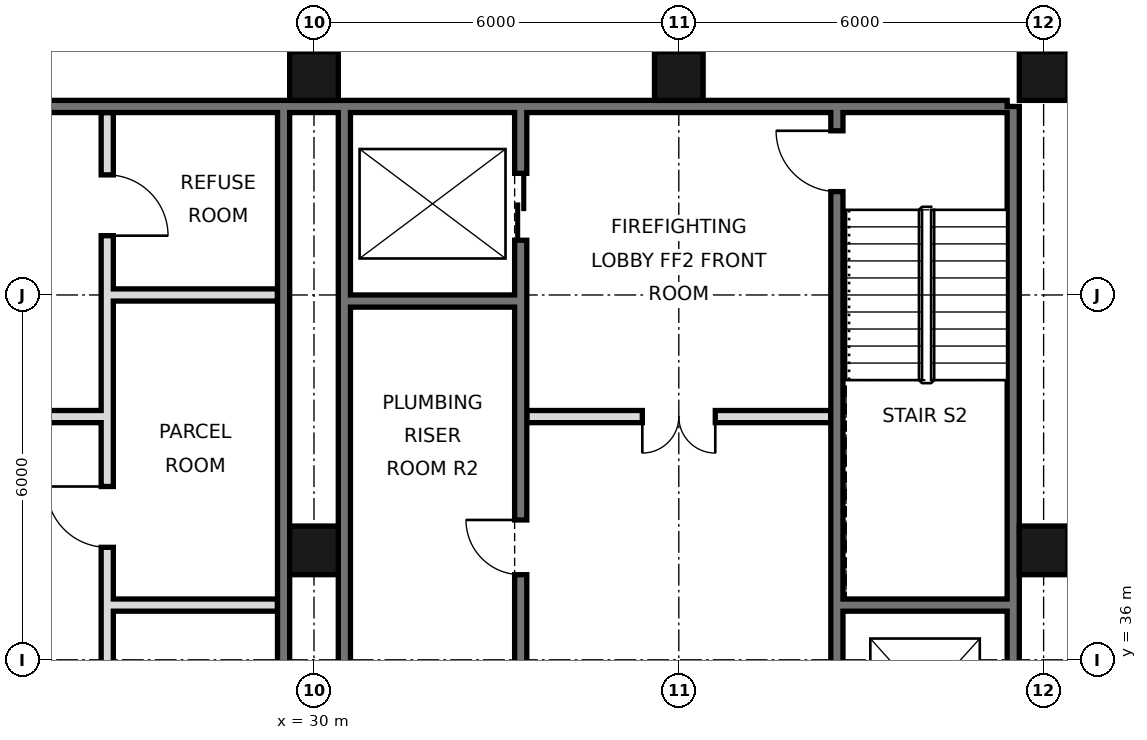
"""IFC4 building model, lengths in metres.
Left out: names, types, materials, properties, quantities, classifications, styles, units other than length and angle.
Written with IfcOpenShell. Run it as: python <this file> out.ifc"""

import sys

from ifc_helpers import new_model, si_unit, direction, frame, frame_2d, origin, origin_2d, place, context, subcontext, project, spatial, rectangle, hollow_rectangle, extrude, element, fill, save


model = new_model("IFC4")
c1 = context("Model", 3, precision=1e-05, world=origin(), true_north=direction((0.0, 1.0)))
c2 = subcontext(c1, "Body", "Model", "MODEL_VIEW")
j1 = project(units=[si_unit("LENGTHUNIT", "METRE"), si_unit("PLANEANGLEUNIT", "RADIAN")], contexts=[c1])
p1 = place(None, origin())
s1 = spatial("IfcSite", under=j1, at=p1, CompositionType="ELEMENT")
p2 = place(p1, origin())
s2 = spatial("IfcBuilding", under=s1, at=p2, CompositionType="ELEMENT")
p3 = place(p2, frame((0.0, 0.0, 202.8)))
s3 = spatial("IfcBuildingStorey", under=s2, at=p3, CompositionType="ELEMENT", Elevation=202.8)
for number, where, z_axis, x_axis in (
    (1, (30.0, 37.8, 0.0), (0.0, 0.0, 1.0), (1.0, 0.0, 0.0)),
    (2, (30.0, 45.6, 0.0), (0.0, 0.0, 1.0), (1.0, 0.0, 0.0)),
    (3, (36.0, 45.6, 0.0), (0.0, 0.0, 1.0), (1.0, 0.0, 0.0)),
    (4, (42.0, 37.8, 0.0), (0.0, 0.0, 1.0), (1.0, 0.0, 0.0)),
    (5, (42.0, 45.6, 0.0), (0.0, 0.0, 1.0), (1.0, 0.0, 0.0)),
):
    element("IfcColumn", number, at=place(p3, frame(where, z_axis=z_axis, x_axis=x_axis)), inside=s3, PredefinedType="COLUMN", context=c2, shape_type="SweptSolid", body=[
        extrude(hollow_rectangle(XDim=0.8, YDim=0.8, WallThickness=0.04, at=origin_2d()), origin(), (0.0, 0.0, 1.0), 3.6),
    ])
p4 = place(p3, frame((41.5, 21.6, 0.0), z_axis=(0.0, 0.0, 1.0), x_axis=(0.0, 1.0, 0.0)))
e6 = element("IfcWall", 6, at=p4, inside=s3, PredefinedType="SOLIDWALL", context=c2, shape_type="SweptSolid", body=[
    extrude(rectangle(XDim=23.5, YDim=0.2, at=frame_2d((11.75, 0.0))), origin(), (0.0, 0.0, 1.0), 3.42),
])
p5 = place(p3, frame((6.6, 45.1, 0.0), z_axis=(0.0, 0.0, 1.0), x_axis=(1.0, 0.0, 0.0)))
e7 = element("IfcWall", 7, at=p5, inside=s3, PredefinedType="SOLIDWALL", context=c2, shape_type="SweptSolid", body=[
    extrude(rectangle(XDim=34.8, YDim=0.2, at=frame_2d((17.4, 0.0))), origin(), (0.0, 0.0, 1.0), 3.42),
])
for number, where, z_axis, x_axis in (
    (8, (29.5, 27.6, 0.0), (0.0, 0.0, 1.0), (0.0, 1.0, 0.0)),
    (9, (30.5, 27.6, 0.0), (0.0, 0.0, 1.0), (0.0, 1.0, 0.0)),
):
    element("IfcWall", number, at=place(p3, frame(where, z_axis=z_axis, x_axis=x_axis)), inside=s3, PredefinedType="SOLIDWALL", context=c2, shape_type="SweptSolid", body=[
        extrude(rectangle(XDim=17.5, YDim=0.2, at=frame_2d((8.75, 0.0))), origin(), (0.0, 0.0, 1.0), 3.42),
    ])
p6 = place(p3, frame((26.6, 27.5, 0.0), z_axis=(0.0, 0.0, 1.0), x_axis=(0.0, 1.0, 0.0)))
e10 = element("IfcWall", 10, at=p6, inside=s3, PredefinedType="SOLIDWALL", context=c2, shape_type="SweptSolid", body=[
    extrude(rectangle(XDim=17.5, YDim=0.2, at=frame_2d((8.75, 0.0))), origin(), (0.0, 0.0, 1.0), 3.42),
])
p7 = place(p6, frame((4.3, 0.0, 0.0)))
e11 = element("IfcOpeningElement", 11, at=p7, cuts=e10, PredefinedType="OPENING", context=c2, shape_type="SweptSolid", body=[
    extrude(rectangle(XDim=0.9, YDim=2.1, at=frame_2d((0.45, 1.05))), frame((0.0, 0.11, 0.0), z_axis=(0.0, -1.0, 0.0), x_axis=(1.0, 0.0, 0.0)), (0.0, 0.0, 1.0), 0.22),
])
p8 = place(p6, frame((10.35, 0.0, 0.0)))
e12 = element("IfcOpeningElement", 12, at=p8, cuts=e10, PredefinedType="OPENING", context=c2, shape_type="SweptSolid", body=[
    extrude(rectangle(XDim=1.0, YDim=2.1, at=frame_2d((0.5, 1.05))), frame((0.0, 0.11, 0.0), z_axis=(0.0, -1.0, 0.0), x_axis=(1.0, 0.0, 0.0)), (0.0, 0.0, 1.0), 0.22),
])
p9 = place(p6, frame((15.475, 0.0, 0.0)))
e13 = element("IfcOpeningElement", 13, at=p9, cuts=e10, PredefinedType="OPENING", context=c2, shape_type="SweptSolid", body=[
    extrude(rectangle(XDim=1.0, YDim=2.1, at=frame_2d((0.5, 1.05))), frame((0.0, 0.11, 0.0), z_axis=(0.0, -1.0, 0.0), x_axis=(1.0, 0.0, 0.0)), (0.0, 0.0, 1.0), 0.22),
])
p10 = place(p3, frame((33.4, 27.5, 0.0), z_axis=(0.0, 0.0, 1.0), x_axis=(0.0, 1.0, 0.0)))
e14 = element("IfcWall", 14, at=p10, inside=s3, PredefinedType="SOLIDWALL", context=c2, shape_type="SweptSolid", body=[
    extrude(rectangle(XDim=17.5, YDim=0.2, at=frame_2d((8.75, 0.0))), origin(), (0.0, 0.0, 1.0), 3.42),
])
p11 = place(p10, frame((1.1, 0.0, 0.0)))
e15 = element("IfcOpeningElement", 15, at=p11, cuts=e14, PredefinedType="OPENING", context=c2, shape_type="SweptSolid", body=[
    extrude(rectangle(XDim=1.1, YDim=2.1, at=frame_2d((0.55, 1.05))), frame((0.0, 0.11, 0.0), z_axis=(0.0, -1.0, 0.0), x_axis=(1.0, 0.0, 0.0)), (0.0, 0.0, 1.0), 0.22),
])
p12 = place(p10, frame((4.2, 0.0, 0.0)))
e16 = element("IfcOpeningElement", 16, at=p12, cuts=e14, PredefinedType="OPENING", context=c2, shape_type="SweptSolid", body=[
    extrude(rectangle(XDim=1.1, YDim=2.1, at=frame_2d((0.55, 1.05))), frame((0.0, 0.11, 0.0), z_axis=(0.0, -1.0, 0.0), x_axis=(1.0, 0.0, 0.0)), (0.0, 0.0, 1.0), 0.22),
])
p13 = place(p10, frame((15.4, 0.0, 0.0)))
e17 = element("IfcOpeningElement", 17, at=p13, cuts=e14, PredefinedType="OPENING", context=c2, shape_type="SweptSolid", body=[
    extrude(rectangle(XDim=1.1, YDim=2.1, at=frame_2d((0.55, 1.05))), frame((0.0, 0.11, 0.0), z_axis=(0.0, -1.0, 0.0), x_axis=(1.0, 0.0, 0.0)), (0.0, 0.0, 1.0), 0.22),
])
p14 = place(p10, frame((9.9, 0.0, 0.0)))
e18 = element("IfcOpeningElement", 18, at=p14, cuts=e14, PredefinedType="OPENING", context=c2, shape_type="SweptSolid", body=[
    extrude(rectangle(XDim=0.9, YDim=2.1, at=frame_2d((0.45, 1.05))), frame((0.0, 0.11, 0.0), z_axis=(0.0, -1.0, 0.0), x_axis=(1.0, 0.0, 0.0)), (0.0, 0.0, 1.0), 0.22),
])
p15 = place(p3, frame((38.6, 21.6, 0.0), z_axis=(0.0, 0.0, 1.0), x_axis=(0.0, 1.0, 0.0)))
e19 = element("IfcWall", 19, at=p15, inside=s3, PredefinedType="SOLIDWALL", context=c2, shape_type="SweptSolid", body=[
    extrude(rectangle(XDim=23.4, YDim=0.2, at=frame_2d((11.7, 0.0))), origin(), (0.0, 0.0, 1.0), 3.42),
])
p16 = place(p15, frame((7.0, 0.0, 0.0)))
e20 = element("IfcOpeningElement", 20, at=p16, cuts=e19, PredefinedType="OPENING", context=c2, shape_type="SweptSolid", body=[
    extrude(rectangle(XDim=1.1, YDim=2.1, at=frame_2d((0.55, 1.05))), frame((0.0, 0.11, 0.0), z_axis=(0.0, -1.0, 0.0), x_axis=(1.0, 0.0, 0.0)), (0.0, 0.0, 1.0), 0.22),
])
p17 = place(p15, frame((10.1, 0.0, 0.0)))
e21 = element("IfcOpeningElement", 21, at=p17, cuts=e19, PredefinedType="OPENING", context=c2, shape_type="SweptSolid", body=[
    extrude(rectangle(XDim=1.1, YDim=2.1, at=frame_2d((0.55, 1.05))), frame((0.0, 0.11, 0.0), z_axis=(0.0, -1.0, 0.0), x_axis=(1.0, 0.0, 0.0)), (0.0, 0.0, 1.0), 0.22),
])
p18 = place(p15, frame((13.2, 0.0, 0.0)))
e22 = element("IfcOpeningElement", 22, at=p18, cuts=e19, PredefinedType="OPENING", context=c2, shape_type="SweptSolid", body=[
    extrude(rectangle(XDim=1.1, YDim=2.1, at=frame_2d((0.55, 1.05))), frame((0.0, 0.11, 0.0), z_axis=(0.0, -1.0, 0.0), x_axis=(1.0, 0.0, 0.0)), (0.0, 0.0, 1.0), 0.22),
])
p19 = place(p15, frame((22.1, 0.0, 0.0)))
e23 = element("IfcOpeningElement", 23, at=p19, cuts=e19, PredefinedType="OPENING", context=c2, shape_type="SweptSolid", body=[
    extrude(rectangle(XDim=1.0, YDim=2.1, at=frame_2d((0.5, 1.05))), frame((0.0, 0.11, 0.0), z_axis=(0.0, -1.0, 0.0), x_axis=(1.0, 0.0, 0.0)), (0.0, 0.0, 1.0), 0.22),
])
p20 = place(p15, frame((0.175, 0.0, 0.0)))
e24 = element("IfcOpeningElement", 24, at=p20, cuts=e19, PredefinedType="OPENING", context=c2, shape_type="SweptSolid", body=[
    extrude(rectangle(XDim=0.9, YDim=2.1, at=frame_2d((0.45, 1.05))), frame((0.0, 0.11, 0.0), z_axis=(0.0, -1.0, 0.0), x_axis=(1.0, 0.0, 0.0)), (0.0, 0.0, 1.0), 0.22),
])
for number, where, z_axis, x_axis in (
    (25, (26.7, 36.9, 0.0), (0.0, 0.0, 1.0), (1.0, 0.0, 0.0)),
    (26, (38.7, 36.9, 0.0), (0.0, 0.0, 1.0), (1.0, 0.0, 0.0)),
):
    element("IfcWall", number, at=place(p3, frame(where, z_axis=z_axis, x_axis=x_axis)), inside=s3, PredefinedType="SOLIDWALL", context=c2, shape_type="SweptSolid", body=[
        extrude(rectangle(XDim=2.7, YDim=0.2, at=frame_2d((1.35, 0.0))), origin(), (0.0, 0.0, 1.0), 3.42),
    ])
p21 = place(p3, frame((21.5, 40.0, 0.0), z_axis=(0.0, 0.0, 1.0), x_axis=(1.0, 0.0, 0.0)))
e27 = element("IfcWall", 27, at=p21, inside=s3, PredefinedType="PARTITIONING", context=c2, shape_type="SweptSolid", body=[
    extrude(rectangle(XDim=5.0, YDim=0.2, at=frame_2d((2.5, 0.0))), origin(), (0.0, 0.0, 1.0), 3.42),
])
p22 = place(p21, frame((1.9, 0.0, 0.0)))
e28 = element("IfcOpeningElement", 28, at=p22, cuts=e27, PredefinedType="OPENING", context=c2, shape_type="SweptSolid", body=[
    extrude(rectangle(XDim=1.2, YDim=2.1, at=frame_2d((0.6, 1.05))), frame((0.0, 0.11, 0.0), z_axis=(0.0, -1.0, 0.0), x_axis=(1.0, 0.0, 0.0)), (0.0, 0.0, 1.0), 0.22),
])
p23 = place(p3, frame((33.5, 40.0, 0.0), z_axis=(0.0, 0.0, 1.0), x_axis=(1.0, 0.0, 0.0)))
e29 = element("IfcWall", 29, at=p23, inside=s3, PredefinedType="PARTITIONING", context=c2, shape_type="SweptSolid", body=[
    extrude(rectangle(XDim=5.0, YDim=0.2, at=frame_2d((2.5, 0.0))), origin(), (0.0, 0.0, 1.0), 3.42),
])
p24 = place(p23, frame((1.9, 0.0, 0.0)))
e30 = element("IfcOpeningElement", 30, at=p24, cuts=e29, PredefinedType="OPENING", context=c2, shape_type="SweptSolid", body=[
    extrude(rectangle(XDim=1.2, YDim=2.1, at=frame_2d((0.6, 1.05))), frame((0.0, 0.11, 0.0), z_axis=(0.0, -1.0, 0.0), x_axis=(1.0, 0.0, 0.0)), (0.0, 0.0, 1.0), 0.22),
])
p25 = place(p3, frame((30.6, 41.9, 0.0), z_axis=(0.0, 0.0, 1.0), x_axis=(1.0, 0.0, 0.0)))
e31 = element("IfcWall", 31, at=p25, inside=s3, PredefinedType="SOLIDWALL", context=c2, shape_type="SweptSolid", body=[
    extrude(rectangle(XDim=2.7, YDim=0.2, at=frame_2d((1.35, 0.0))), origin(), (0.0, 0.0, 1.0), 3.42),
])
p26 = place(p3, frame((26.7, 42.0, 0.0), z_axis=(0.0, 0.0, 1.0), x_axis=(1.0, 0.0, 0.0)))
e32 = element("IfcWall", 32, at=p26, inside=s3, PredefinedType="PARTITIONING", context=c2, shape_type="SweptSolid", body=[
    extrude(rectangle(XDim=2.7, YDim=0.2, at=frame_2d((1.35, 0.0))), origin(), (0.0, 0.0, 1.0), 3.42),
])
p27 = place(p24, frame((1.2, 0.0, 0.0), z_axis=(0.0, 0.0, 1.0), x_axis=(-1.0, 0.0, 0.0)))
e33 = element("IfcDoor", 33, at=p27, inside=s3, OperationType="DOUBLE_DOOR_SINGLE_SWING", PredefinedType="DOOR", context=c2, shape_type="SweptSolid", body=[
    extrude(rectangle(XDim=1.2, YDim=2.1, at=frame_2d((0.6, 1.05))), frame((0.0, 0.025, 0.0), z_axis=(0.0, -1.0, 0.0), x_axis=(1.0, 0.0, 0.0)), (0.0, 0.0, 1.0), 0.05),
])
fill(e30, e33)
p28 = place(p13, origin())
e34 = element("IfcDoor", 34, at=p28, inside=s3, OperationType="DOUBLE_DOOR_SLIDING", PredefinedType="DOOR", context=c2, shape_type="SweptSolid", body=[
    extrude(rectangle(XDim=1.1, YDim=2.1, at=frame_2d((0.55, 1.05))), frame((0.0, 0.025, 0.0), z_axis=(0.0, -1.0, 0.0), x_axis=(1.0, 0.0, 0.0)), (0.0, 0.0, 1.0), 0.05),
])
fill(e17, e34)
p29 = place(p19, frame((1.0, 0.0, 0.0), z_axis=(0.0, 0.0, 1.0), x_axis=(-1.0, 0.0, 0.0)))
e35 = element("IfcDoor", 35, at=p29, inside=s3, OperationType="SINGLE_SWING_LEFT", PredefinedType="DOOR", context=c2, shape_type="SweptSolid", body=[
    extrude(rectangle(XDim=1.0, YDim=2.1, at=frame_2d((0.5, 1.05))), frame((0.0, 0.025, 0.0), z_axis=(0.0, -1.0, 0.0), x_axis=(1.0, 0.0, 0.0)), (0.0, 0.0, 1.0), 0.05),
])
fill(e23, e35)
p30 = place(p14, frame((0.9, 0.0, 0.0), z_axis=(0.0, 0.0, 1.0), x_axis=(-1.0, 0.0, 0.0)))
e36 = element("IfcDoor", 36, at=p30, inside=s3, OperationType="SINGLE_SWING_LEFT", PredefinedType="DOOR", context=c2, shape_type="SweptSolid", body=[
    extrude(rectangle(XDim=0.9, YDim=2.1, at=frame_2d((0.45, 1.05))), frame((0.0, 0.025, 0.0), z_axis=(0.0, -1.0, 0.0), x_axis=(1.0, 0.0, 0.0)), (0.0, 0.0, 1.0), 0.05),
])
fill(e18, e36)
p31 = place(p8, frame((1.0, 0.0, 0.0), z_axis=(0.0, 0.0, 1.0), x_axis=(-1.0, 0.0, 0.0)))
e37 = element("IfcDoor", 37, at=p31, inside=s3, OperationType="SINGLE_SWING_LEFT", PredefinedType="DOOR", context=c2, shape_type="SweptSolid", body=[
    extrude(rectangle(XDim=1.0, YDim=2.1, at=frame_2d((0.5, 1.05))), frame((0.0, 0.025, 0.0), z_axis=(0.0, -1.0, 0.0), x_axis=(1.0, 0.0, 0.0)), (0.0, 0.0, 1.0), 0.05),
])
fill(e12, e37)
p32 = place(p9, frame((1.0, 0.0, 0.0), z_axis=(0.0, 0.0, 1.0), x_axis=(-1.0, 0.0, 0.0)))
e38 = element("IfcDoor", 38, at=p32, inside=s3, OperationType="SINGLE_SWING_RIGHT", PredefinedType="DOOR", context=c2, shape_type="SweptSolid", body=[
    extrude(rectangle(XDim=1.0, YDim=2.1, at=frame_2d((0.5, 1.05))), frame((0.0, 0.025, 0.0), z_axis=(0.0, -1.0, 0.0), x_axis=(1.0, 0.0, 0.0)), (0.0, 0.0, 1.0), 0.05),
])
fill(e13, e38)
save(model, sys.argv[1])
